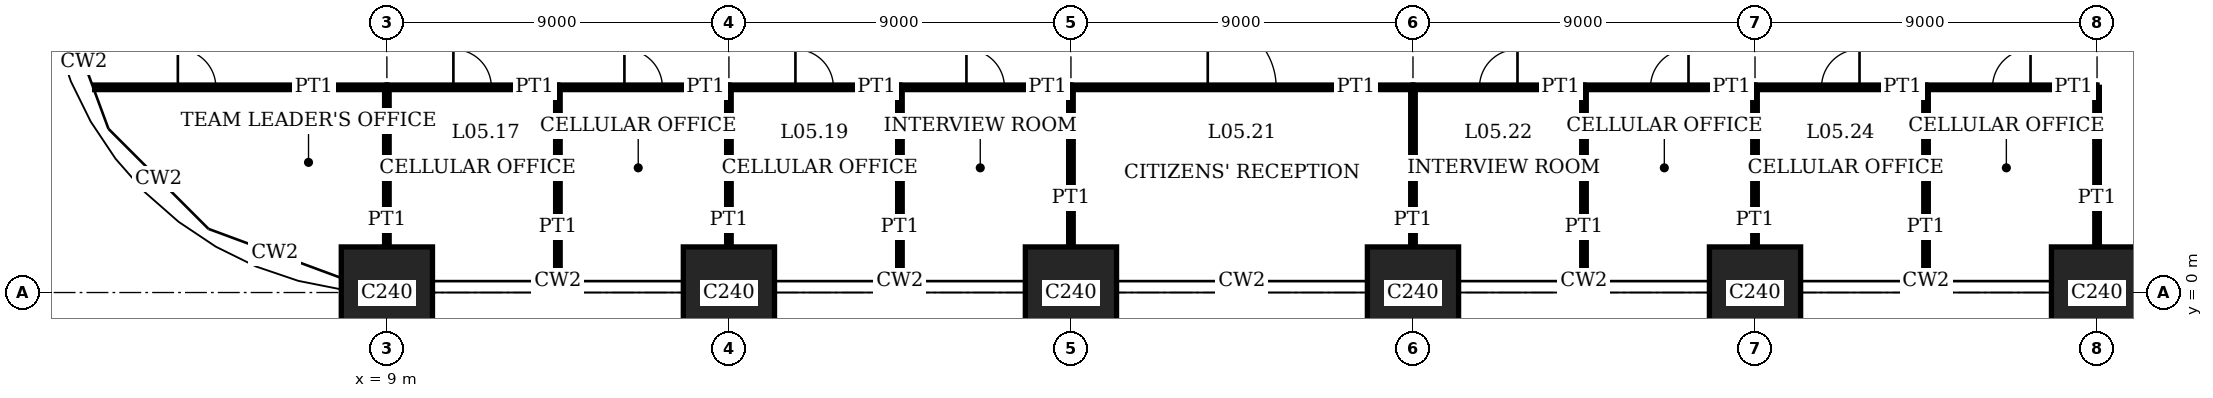
"""IFC4 building model, lengths in metres.
Left out: names, types, materials, properties, quantities, classifications, styles, units other than length and angle.
Written with IfcOpenShell. Run it as: python <this file> out.ifc"""

import sys

from ifc_helpers import new_model, si_unit, direction, frame, frame_2d, origin, origin_2d, place, context, subcontext, project, spatial, rectangle, extrude, element, fill, save


model = new_model("IFC4")
c1 = context("Model", 3, precision=1e-05, world=origin(), true_north=direction((0.0, 1.0)))
c2 = subcontext(c1, "Body", "Model", "MODEL_VIEW")
j1 = project(units=[si_unit("LENGTHUNIT", "METRE"), si_unit("PLANEANGLEUNIT", "RADIAN")], contexts=[c1])
p1 = place(None, origin())
s1 = spatial("IfcSite", under=j1, at=p1, CompositionType="ELEMENT")
p2 = place(p1, origin())
s2 = spatial("IfcBuilding", under=s1, at=p2, CompositionType="ELEMENT")
p3 = place(p2, frame((0.0, 0.0, 23.8)))
s3 = spatial("IfcBuildingStorey", under=s2, at=p3, CompositionType="ELEMENT", Elevation=23.8)
for number, where, z_axis, x_axis in (
    (1, (9.0, 0.0, 0.0), (0.0, 0.0, 1.0), (1.0, 0.0, 0.0)),
    (2, (18.0, 0.0, 0.0), (0.0, 0.0, 1.0), (1.0, 0.0, 0.0)),
    (3, (27.0, 0.0, 0.0), (0.0, 0.0, 1.0), (1.0, 0.0, 0.0)),
    (4, (36.0, 0.0, 0.0), (0.0, 0.0, 1.0), (1.0, 0.0, 0.0)),
    (5, (45.0, 0.0, 0.0), (0.0, 0.0, 1.0), (1.0, 0.0, 0.0)),
    (6, (54.0, 0.0, 0.0), (0.0, 0.0, 1.0), (1.0, 0.0, 0.0)),
):
    element("IfcColumn", number, at=place(p3, frame(where, z_axis=z_axis, x_axis=x_axis)), inside=s3, PredefinedType="COLUMN", context=c2, shape_type="SweptSolid", body=[
        extrude(rectangle(XDim=2.4, YDim=2.4, at=origin_2d()), origin(), (0.0, 0.0, 1.0), 4.0),
    ])
p4 = place(p3, frame((9.0, 5.4, 0.0), z_axis=(0.0, 0.0, 1.0), x_axis=(1.0, 0.0, 0.0)))
e7 = element("IfcWall", 7, at=p4, inside=s3, PredefinedType="PARTITIONING", context=c2, shape_type="SweptSolid", body=[
    extrude(rectangle(XDim=4.5, YDim=0.12, at=frame_2d((2.25, 0.0))), origin(), (0.0, 0.0, 1.0), 3.75),
])
p5 = place(p4, frame((1.75, 0.0, 0.0)))
e8 = element("IfcOpeningElement", 8, at=p5, cuts=e7, PredefinedType="OPENING", context=c2, shape_type="SweptSolid", body=[
    extrude(rectangle(XDim=1.0, YDim=2.4, at=frame_2d((0.5, 1.2))), frame((0.0, 0.07, 0.0), z_axis=(0.0, -1.0, 0.0), x_axis=(1.0, 0.0, 0.0)), (0.0, 0.0, 1.0), 0.14),
])
p6 = place(p3, frame((13.5, 5.4, 0.0), z_axis=(0.0, 0.0, 1.0), x_axis=(1.0, 0.0, 0.0)))
e9 = element("IfcWall", 9, at=p6, inside=s3, PredefinedType="PARTITIONING", context=c2, shape_type="SweptSolid", body=[
    extrude(rectangle(XDim=4.5, YDim=0.12, at=frame_2d((2.25, 0.0))), origin(), (0.0, 0.0, 1.0), 3.75),
])
p7 = place(p6, frame((1.75, 0.0, 0.0)))
e10 = element("IfcOpeningElement", 10, at=p7, cuts=e9, PredefinedType="OPENING", context=c2, shape_type="SweptSolid", body=[
    extrude(rectangle(XDim=1.0, YDim=2.4, at=frame_2d((0.5, 1.2))), frame((0.0, 0.07, 0.0), z_axis=(0.0, -1.0, 0.0), x_axis=(1.0, 0.0, 0.0)), (0.0, 0.0, 1.0), 0.14),
])
p8 = place(p3, frame((18.0, 5.4, 0.0), z_axis=(0.0, 0.0, 1.0), x_axis=(1.0, 0.0, 0.0)))
e11 = element("IfcWall", 11, at=p8, inside=s3, PredefinedType="PARTITIONING", context=c2, shape_type="SweptSolid", body=[
    extrude(rectangle(XDim=4.5, YDim=0.12, at=frame_2d((2.25, 0.0))), origin(), (0.0, 0.0, 1.0), 3.75),
])
p9 = place(p8, frame((1.75, 0.0, 0.0)))
e12 = element("IfcOpeningElement", 12, at=p9, cuts=e11, PredefinedType="OPENING", context=c2, shape_type="SweptSolid", body=[
    extrude(rectangle(XDim=1.0, YDim=2.4, at=frame_2d((0.5, 1.2))), frame((0.0, 0.07, 0.0), z_axis=(0.0, -1.0, 0.0), x_axis=(1.0, 0.0, 0.0)), (0.0, 0.0, 1.0), 0.14),
])
p10 = place(p3, frame((22.5, 5.4, 0.0), z_axis=(0.0, 0.0, 1.0), x_axis=(1.0, 0.0, 0.0)))
e13 = element("IfcWall", 13, at=p10, inside=s3, PredefinedType="PARTITIONING", context=c2, shape_type="SweptSolid", body=[
    extrude(rectangle(XDim=4.5, YDim=0.12, at=frame_2d((2.25, 0.0))), origin(), (0.0, 0.0, 1.0), 3.75),
])
p11 = place(p10, frame((1.75, 0.0, 0.0)))
e14 = element("IfcOpeningElement", 14, at=p11, cuts=e13, PredefinedType="OPENING", context=c2, shape_type="SweptSolid", body=[
    extrude(rectangle(XDim=1.0, YDim=2.4, at=frame_2d((0.5, 1.2))), frame((0.0, 0.07, 0.0), z_axis=(0.0, -1.0, 0.0), x_axis=(1.0, 0.0, 0.0)), (0.0, 0.0, 1.0), 0.14),
])
p12 = place(p3, frame((27.0, 5.4, 0.0), z_axis=(0.0, 0.0, 1.0), x_axis=(1.0, 0.0, 0.0)))
e15 = element("IfcWall", 15, at=p12, inside=s3, PredefinedType="PARTITIONING", context=c2, shape_type="SweptSolid", body=[
    extrude(rectangle(XDim=9.0, YDim=0.12, at=frame_2d((4.5, 0.0))), origin(), (0.0, 0.0, 1.0), 3.75),
])
p13 = place(p12, frame((3.6, 0.0, 0.0)))
e16 = element("IfcOpeningElement", 16, at=p13, cuts=e15, PredefinedType="OPENING", context=c2, shape_type="SweptSolid", body=[
    extrude(rectangle(XDim=1.8, YDim=2.4, at=frame_2d((0.9, 1.2))), frame((0.0, 0.07, 0.0), z_axis=(0.0, -1.0, 0.0), x_axis=(1.0, 0.0, 0.0)), (0.0, 0.0, 1.0), 0.14),
])
p14 = place(p3, frame((36.0, 5.4, 0.0), z_axis=(0.0, 0.0, 1.0), x_axis=(1.0, 0.0, 0.0)))
e17 = element("IfcWall", 17, at=p14, inside=s3, PredefinedType="PARTITIONING", context=c2, shape_type="SweptSolid", body=[
    extrude(rectangle(XDim=4.5, YDim=0.12, at=frame_2d((2.25, 0.0))), origin(), (0.0, 0.0, 1.0), 3.75),
])
p15 = place(p14, frame((1.75, 0.0, 0.0)))
e18 = element("IfcOpeningElement", 18, at=p15, cuts=e17, PredefinedType="OPENING", context=c2, shape_type="SweptSolid", body=[
    extrude(rectangle(XDim=1.0, YDim=2.4, at=frame_2d((0.5, 1.2))), frame((0.0, 0.07, 0.0), z_axis=(0.0, -1.0, 0.0), x_axis=(1.0, 0.0, 0.0)), (0.0, 0.0, 1.0), 0.14),
])
p16 = place(p3, frame((40.5, 5.4, 0.0), z_axis=(0.0, 0.0, 1.0), x_axis=(1.0, 0.0, 0.0)))
e19 = element("IfcWall", 19, at=p16, inside=s3, PredefinedType="PARTITIONING", context=c2, shape_type="SweptSolid", body=[
    extrude(rectangle(XDim=4.5, YDim=0.12, at=frame_2d((2.25, 0.0))), origin(), (0.0, 0.0, 1.0), 3.75),
])
p17 = place(p16, frame((1.75, 0.0, 0.0)))
e20 = element("IfcOpeningElement", 20, at=p17, cuts=e19, PredefinedType="OPENING", context=c2, shape_type="SweptSolid", body=[
    extrude(rectangle(XDim=1.0, YDim=2.4, at=frame_2d((0.5, 1.2))), frame((0.0, 0.07, 0.0), z_axis=(0.0, -1.0, 0.0), x_axis=(1.0, 0.0, 0.0)), (0.0, 0.0, 1.0), 0.14),
])
p18 = place(p3, frame((45.0, 5.4, 0.0), z_axis=(0.0, 0.0, 1.0), x_axis=(1.0, 0.0, 0.0)))
e21 = element("IfcWall", 21, at=p18, inside=s3, PredefinedType="PARTITIONING", context=c2, shape_type="SweptSolid", body=[
    extrude(rectangle(XDim=4.5, YDim=0.12, at=frame_2d((2.25, 0.0))), origin(), (0.0, 0.0, 1.0), 3.75),
])
p19 = place(p18, frame((1.75, 0.0, 0.0)))
e22 = element("IfcOpeningElement", 22, at=p19, cuts=e21, PredefinedType="OPENING", context=c2, shape_type="SweptSolid", body=[
    extrude(rectangle(XDim=1.0, YDim=2.4, at=frame_2d((0.5, 1.2))), frame((0.0, 0.07, 0.0), z_axis=(0.0, -1.0, 0.0), x_axis=(1.0, 0.0, 0.0)), (0.0, 0.0, 1.0), 0.14),
])
p20 = place(p3, frame((49.5, 5.4, 0.0), z_axis=(0.0, 0.0, 1.0), x_axis=(1.0, 0.0, 0.0)))
e23 = element("IfcWall", 23, at=p20, inside=s3, PredefinedType="PARTITIONING", context=c2, shape_type="SweptSolid", body=[
    extrude(rectangle(XDim=4.5, YDim=0.12, at=frame_2d((2.25, 0.0))), origin(), (0.0, 0.0, 1.0), 3.75),
])
p21 = place(p20, frame((1.75, 0.0, 0.0)))
e24 = element("IfcOpeningElement", 24, at=p21, cuts=e23, PredefinedType="OPENING", context=c2, shape_type="SweptSolid", body=[
    extrude(rectangle(XDim=1.0, YDim=2.4, at=frame_2d((0.5, 1.2))), frame((0.0, 0.07, 0.0), z_axis=(0.0, -1.0, 0.0), x_axis=(1.0, 0.0, 0.0)), (0.0, 0.0, 1.0), 0.14),
])
p22 = place(p3, frame((1.31, 5.4, 0.0), z_axis=(0.0, 0.0, 1.0), x_axis=(1.0, 0.0, 0.0)))
e25 = element("IfcWall", 25, at=p22, inside=s3, PredefinedType="PARTITIONING", context=c2, shape_type="SweptSolid", body=[
    extrude(rectangle(XDim=7.69, YDim=0.12, at=frame_2d((3.845, 0.0))), origin(), (0.0, 0.0, 1.0), 3.75),
])
p23 = place(p22, frame((2.19, 0.0, 0.0)))
e26 = element("IfcOpeningElement", 26, at=p23, cuts=e25, PredefinedType="OPENING", context=c2, shape_type="SweptSolid", body=[
    extrude(rectangle(XDim=1.0, YDim=2.4, at=frame_2d((0.5, 1.2))), frame((0.0, 0.07, 0.0), z_axis=(0.0, -1.0, 0.0), x_axis=(1.0, 0.0, 0.0)), (0.0, 0.0, 1.0), 0.14),
])
p24 = place(p3, frame((9.0, 1.2, 0.0), z_axis=(0.0, 0.0, 1.0), x_axis=(0.0, 1.0, 0.0)))
e27 = element("IfcWall", 27, at=p24, inside=s3, PredefinedType="PARTITIONING", context=c2, shape_type="SweptSolid", body=[
    extrude(rectangle(XDim=4.2, YDim=0.12, at=frame_2d((2.1, 0.0))), origin(), (0.0, 0.0, 1.0), 3.05),
])
p25 = place(p3, frame((13.5, 0.31, 0.0), z_axis=(0.0, 0.0, 1.0), x_axis=(0.0, 1.0, 0.0)))
e28 = element("IfcWall", 28, at=p25, inside=s3, PredefinedType="PARTITIONING", context=c2, shape_type="SweptSolid", body=[
    extrude(rectangle(XDim=5.09, YDim=0.12, at=frame_2d((2.545, 0.0))), origin(), (0.0, 0.0, 1.0), 3.75),
])
p26 = place(p3, frame((18.0, 1.2, 0.0), z_axis=(0.0, 0.0, 1.0), x_axis=(0.0, 1.0, 0.0)))
e29 = element("IfcWall", 29, at=p26, inside=s3, PredefinedType="PARTITIONING", context=c2, shape_type="SweptSolid", body=[
    extrude(rectangle(XDim=4.2, YDim=0.12, at=frame_2d((2.1, 0.0))), origin(), (0.0, 0.0, 1.0), 3.05),
])
p27 = place(p3, frame((22.5, 0.31, 0.0), z_axis=(0.0, 0.0, 1.0), x_axis=(0.0, 1.0, 0.0)))
e30 = element("IfcWall", 30, at=p27, inside=s3, PredefinedType="PARTITIONING", context=c2, shape_type="SweptSolid", body=[
    extrude(rectangle(XDim=5.09, YDim=0.12, at=frame_2d((2.545, 0.0))), origin(), (0.0, 0.0, 1.0), 3.75),
])
for number, where, z_axis, x_axis in (
    (31, (27.0, 1.2, 0.0), (0.0, 0.0, 1.0), (0.0, 1.0, 0.0)),
    (32, (36.0, 1.2, 0.0), (0.0, 0.0, 1.0), (0.0, 1.0, 0.0)),
):
    element("IfcWall", number, at=place(p3, frame(where, z_axis=z_axis, x_axis=x_axis)), inside=s3, PredefinedType="PARTITIONING", context=c2, shape_type="SweptSolid", body=[
        extrude(rectangle(XDim=4.2, YDim=0.12, at=frame_2d((2.1, 0.0))), origin(), (0.0, 0.0, 1.0), 3.05),
    ])
p28 = place(p3, frame((40.5, 0.31, 0.0), z_axis=(0.0, 0.0, 1.0), x_axis=(0.0, 1.0, 0.0)))
e33 = element("IfcWall", 33, at=p28, inside=s3, PredefinedType="PARTITIONING", context=c2, shape_type="SweptSolid", body=[
    extrude(rectangle(XDim=5.09, YDim=0.12, at=frame_2d((2.545, 0.0))), origin(), (0.0, 0.0, 1.0), 3.75),
])
p29 = place(p3, frame((45.0, 1.2, 0.0), z_axis=(0.0, 0.0, 1.0), x_axis=(0.0, 1.0, 0.0)))
e34 = element("IfcWall", 34, at=p29, inside=s3, PredefinedType="PARTITIONING", context=c2, shape_type="SweptSolid", body=[
    extrude(rectangle(XDim=4.2, YDim=0.12, at=frame_2d((2.1, 0.0))), origin(), (0.0, 0.0, 1.0), 3.05),
])
p30 = place(p3, frame((49.5, 0.31, 0.0), z_axis=(0.0, 0.0, 1.0), x_axis=(0.0, 1.0, 0.0)))
e35 = element("IfcWall", 35, at=p30, inside=s3, PredefinedType="PARTITIONING", context=c2, shape_type="SweptSolid", body=[
    extrude(rectangle(XDim=5.09, YDim=0.12, at=frame_2d((2.545, 0.0))), origin(), (0.0, 0.0, 1.0), 3.75),
])
p31 = place(p3, frame((54.0, 1.2, 0.0), z_axis=(0.0, 0.0, 1.0), x_axis=(0.0, 1.0, 0.0)))
e36 = element("IfcWall", 36, at=p31, inside=s3, PredefinedType="PARTITIONING", context=c2, shape_type="SweptSolid", body=[
    extrude(rectangle(XDim=4.2, YDim=0.12, at=frame_2d((2.1, 0.0))), origin(), (0.0, 0.0, 1.0), 3.05),
])
p32 = place(p5, origin())
e37 = element("IfcDoor", 37, at=p32, inside=s3, OperationType="SINGLE_SWING_RIGHT", PredefinedType="DOOR", context=c2, shape_type="SweptSolid", body=[
    extrude(rectangle(XDim=1.0, YDim=2.4, at=frame_2d((0.5, 1.2))), frame((0.0, 0.025, 0.0), z_axis=(0.0, -1.0, 0.0), x_axis=(1.0, 0.0, 0.0)), (0.0, 0.0, 1.0), 0.05),
])
fill(e8, e37)
p33 = place(p7, origin())
e38 = element("IfcDoor", 38, at=p33, inside=s3, OperationType="SINGLE_SWING_RIGHT", PredefinedType="DOOR", context=c2, shape_type="SweptSolid", body=[
    extrude(rectangle(XDim=1.0, YDim=2.4, at=frame_2d((0.5, 1.2))), frame((0.0, 0.025, 0.0), z_axis=(0.0, -1.0, 0.0), x_axis=(1.0, 0.0, 0.0)), (0.0, 0.0, 1.0), 0.05),
])
fill(e10, e38)
p34 = place(p9, origin())
e39 = element("IfcDoor", 39, at=p34, inside=s3, OperationType="SINGLE_SWING_RIGHT", PredefinedType="DOOR", context=c2, shape_type="SweptSolid", body=[
    extrude(rectangle(XDim=1.0, YDim=2.4, at=frame_2d((0.5, 1.2))), frame((0.0, 0.025, 0.0), z_axis=(0.0, -1.0, 0.0), x_axis=(1.0, 0.0, 0.0)), (0.0, 0.0, 1.0), 0.05),
])
fill(e12, e39)
p35 = place(p11, origin())
e40 = element("IfcDoor", 40, at=p35, inside=s3, OperationType="SINGLE_SWING_RIGHT", PredefinedType="DOOR", context=c2, shape_type="SweptSolid", body=[
    extrude(rectangle(XDim=1.0, YDim=2.4, at=frame_2d((0.5, 1.2))), frame((0.0, 0.025, 0.0), z_axis=(0.0, -1.0, 0.0), x_axis=(1.0, 0.0, 0.0)), (0.0, 0.0, 1.0), 0.05),
])
fill(e14, e40)
p36 = place(p13, origin())
e41 = element("IfcDoor", 41, at=p36, inside=s3, OperationType="DOUBLE_DOOR_SINGLE_SWING", PredefinedType="DOOR", context=c2, shape_type="SweptSolid", body=[
    extrude(rectangle(XDim=1.8, YDim=2.4, at=frame_2d((0.9, 1.2))), frame((0.0, 0.025, 0.0), z_axis=(0.0, -1.0, 0.0), x_axis=(1.0, 0.0, 0.0)), (0.0, 0.0, 1.0), 0.05),
])
fill(e16, e41)
p37 = place(p15, origin())
e42 = element("IfcDoor", 42, at=p37, inside=s3, OperationType="SINGLE_SWING_LEFT", PredefinedType="DOOR", context=c2, shape_type="SweptSolid", body=[
    extrude(rectangle(XDim=1.0, YDim=2.4, at=frame_2d((0.5, 1.2))), frame((0.0, 0.025, 0.0), z_axis=(0.0, -1.0, 0.0), x_axis=(1.0, 0.0, 0.0)), (0.0, 0.0, 1.0), 0.05),
])
fill(e18, e42)
p38 = place(p17, origin())
e43 = element("IfcDoor", 43, at=p38, inside=s3, OperationType="SINGLE_SWING_LEFT", PredefinedType="DOOR", context=c2, shape_type="SweptSolid", body=[
    extrude(rectangle(XDim=1.0, YDim=2.4, at=frame_2d((0.5, 1.2))), frame((0.0, 0.025, 0.0), z_axis=(0.0, -1.0, 0.0), x_axis=(1.0, 0.0, 0.0)), (0.0, 0.0, 1.0), 0.05),
])
fill(e20, e43)
p39 = place(p19, origin())
e44 = element("IfcDoor", 44, at=p39, inside=s3, OperationType="SINGLE_SWING_LEFT", PredefinedType="DOOR", context=c2, shape_type="SweptSolid", body=[
    extrude(rectangle(XDim=1.0, YDim=2.4, at=frame_2d((0.5, 1.2))), frame((0.0, 0.025, 0.0), z_axis=(0.0, -1.0, 0.0), x_axis=(1.0, 0.0, 0.0)), (0.0, 0.0, 1.0), 0.05),
])
fill(e22, e44)
p40 = place(p21, origin())
e45 = element("IfcDoor", 45, at=p40, inside=s3, OperationType="SINGLE_SWING_LEFT", PredefinedType="DOOR", context=c2, shape_type="SweptSolid", body=[
    extrude(rectangle(XDim=1.0, YDim=2.4, at=frame_2d((0.5, 1.2))), frame((0.0, 0.025, 0.0), z_axis=(0.0, -1.0, 0.0), x_axis=(1.0, 0.0, 0.0)), (0.0, 0.0, 1.0), 0.05),
])
fill(e24, e45)
p41 = place(p23, origin())
e46 = element("IfcDoor", 46, at=p41, inside=s3, OperationType="SINGLE_SWING_RIGHT", PredefinedType="DOOR", context=c2, shape_type="SweptSolid", body=[
    extrude(rectangle(XDim=1.0, YDim=2.4, at=frame_2d((0.5, 1.2))), frame((0.0, 0.025, 0.0), z_axis=(0.0, -1.0, 0.0), x_axis=(1.0, 0.0, 0.0)), (0.0, 0.0, 1.0), 0.05),
])
fill(e26, e46)
save(model, sys.argv[1])
